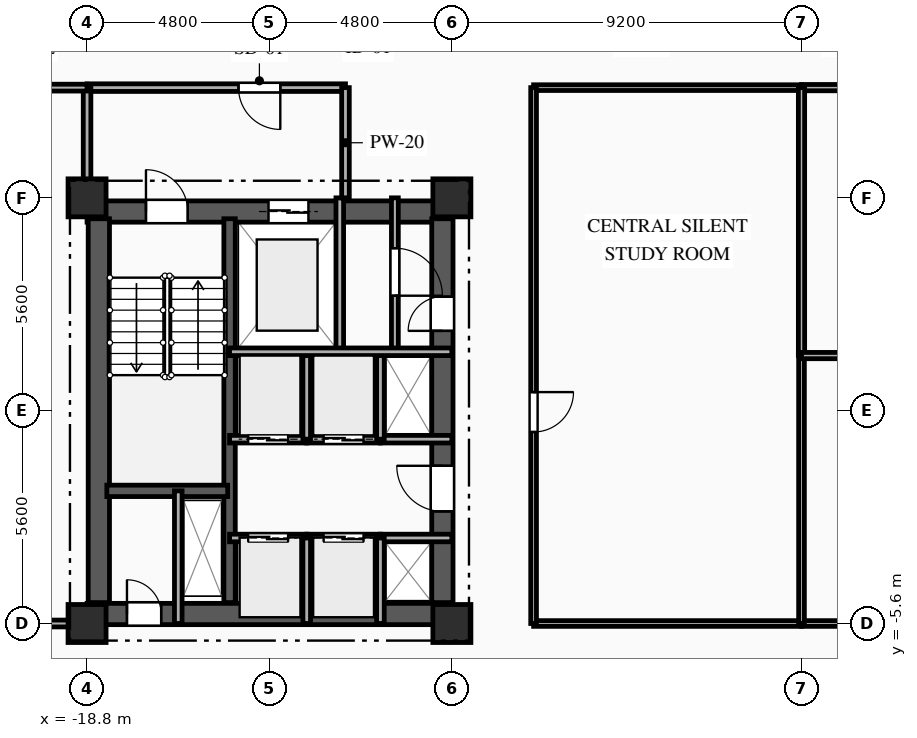
"""IFC4 building model, lengths in metres.
Left out: names, types, materials, properties, quantities, classifications, styles, units other than length and angle.
Written with IfcOpenShell. Run it as: python <this file> out.ifc"""

import sys

from ifc_helpers import new_model, si_unit, direction, frame, frame_2d, origin, origin_2d, place, context, subcontext, project, spatial, rectangle, extrude, element, fill, save


model = new_model("IFC4")
c1 = context("Model", 3, precision=1e-05, world=origin(), true_north=direction((0.0, 1.0)))
c2 = subcontext(c1, "Body", "Model", "MODEL_VIEW")
j1 = project(units=[si_unit("LENGTHUNIT", "METRE"), si_unit("PLANEANGLEUNIT", "RADIAN")], contexts=[c1])
p1 = place(None, origin())
s1 = spatial("IfcSite", under=j1, at=p1, CompositionType="ELEMENT")
p2 = place(p1, origin())
s2 = spatial("IfcBuilding", under=s1, at=p2, CompositionType="ELEMENT")
p3 = place(p2, frame((0.0, 0.0, 89.05)))
s3 = spatial("IfcBuildingStorey", under=s2, at=p3, CompositionType="ELEMENT", Elevation=89.05)
for number, where, z_axis, x_axis in (
    (1, (-18.8, -5.6, 0.0), (0.0, 0.0, 1.0), (1.0, 0.0, 0.0)),
    (2, (-18.8, 5.6, 0.0), (0.0, 0.0, 1.0), (1.0, 0.0, 0.0)),
    (3, (-9.2, -5.6, 0.0), (0.0, 0.0, 1.0), (1.0, 0.0, 0.0)),
    (4, (-9.2, 5.6, 0.0), (0.0, 0.0, 1.0), (1.0, 0.0, 0.0)),
):
    element("IfcColumn", number, at=place(p3, frame(where, z_axis=z_axis, x_axis=x_axis)), inside=s3, PredefinedType="COLUMN", context=c2, shape_type="SweptSolid", body=[
        extrude(rectangle(XDim=1.0, YDim=1.0, at=origin_2d()), origin(), (0.0, 0.0, 1.0), 3.35),
    ])
p4 = place(p3, frame((-18.8, 5.24, 0.0), z_axis=(0.0, 0.0, 1.0), x_axis=(1.0, 0.0, 0.0)))
e5 = element("IfcWall", 5, at=p4, inside=s3, PredefinedType="SHEAR", context=c2, shape_type="SweptSolid", body=[
    extrude(rectangle(XDim=9.6, YDim=0.56, at=frame_2d((4.8, 0.0))), origin(), (0.0, 0.0, 1.0), 3.045),
])
p5 = place(p4, frame((1.55, 0.0, 0.0)))
e6 = element("IfcOpeningElement", 6, at=p5, cuts=e5, PredefinedType="OPENING", context=c2, shape_type="SweptSolid", body=[
    extrude(rectangle(XDim=1.1, YDim=2.15, at=frame_2d((0.55, 1.075))), frame((0.0, 0.29, 0.0), z_axis=(0.0, -1.0, 0.0), x_axis=(1.0, 0.0, 0.0)), (0.0, 0.0, 1.0), 0.58),
])
p6 = place(p4, frame((4.775, 0.0, 0.0)))
e7 = element("IfcOpeningElement", 7, at=p6, cuts=e5, PredefinedType="OPENING", context=c2, shape_type="SweptSolid", body=[
    extrude(rectangle(XDim=1.05, YDim=2.1, at=frame_2d((0.525, 1.05))), frame((0.0, 0.29, 0.0), z_axis=(0.0, -1.0, 0.0), x_axis=(1.0, 0.0, 0.0)), (0.0, 0.0, 1.0), 0.58),
])
p7 = place(p3, frame((-18.8, -5.35, 0.0), z_axis=(0.0, 0.0, 1.0), x_axis=(1.0, 0.0, 0.0)))
e8 = element("IfcWall", 8, at=p7, inside=s3, PredefinedType="SHEAR", context=c2, shape_type="SweptSolid", body=[
    extrude(rectangle(XDim=9.6, YDim=0.56, at=frame_2d((4.8, 0.0))), origin(), (0.0, 0.0, 1.0), 3.045),
])
p8 = place(p7, frame((1.05, 0.0, 0.0)))
e9 = element("IfcOpeningElement", 9, at=p8, cuts=e8, PredefinedType="OPENING", context=c2, shape_type="SweptSolid", body=[
    extrude(rectangle(XDim=0.9, YDim=2.1, at=frame_2d((0.45, 1.05))), frame((0.0, 0.29, 0.0), z_axis=(0.0, -1.0, 0.0), x_axis=(1.0, 0.0, 0.0)), (0.0, 0.0, 1.0), 0.58),
])
p9 = place(p3, frame((-18.49, -5.05, 0.0), z_axis=(0.0, 0.0, 1.0), x_axis=(0.0, 1.0, 0.0)))
e10 = element("IfcWall", 10, at=p9, inside=s3, PredefinedType="SHEAR", context=c2, shape_type="SweptSolid", body=[
    extrude(rectangle(XDim=10.1, YDim=0.56, at=frame_2d((5.05, 0.0))), origin(), (0.0, 0.0, 1.0), 3.045),
])
p10 = place(p3, frame((-9.45, -5.05, 0.0), z_axis=(0.0, 0.0, 1.0), x_axis=(0.0, 1.0, 0.0)))
e11 = element("IfcWall", 11, at=p10, inside=s3, PredefinedType="SHEAR", context=c2, shape_type="SweptSolid", body=[
    extrude(rectangle(XDim=10.1, YDim=0.56, at=frame_2d((5.05, 0.0))), origin(), (0.0, 0.0, 1.0), 3.045),
])
p11 = place(p10, frame((7.15, 0.0, 0.0)))
e12 = element("IfcOpeningElement", 12, at=p11, cuts=e11, PredefinedType="OPENING", context=c2, shape_type="SweptSolid", body=[
    extrude(rectangle(XDim=0.9, YDim=2.1, at=frame_2d((0.45, 1.05))), frame((0.0, 0.29, 0.0), z_axis=(0.0, -1.0, 0.0), x_axis=(1.0, 0.0, 0.0)), (0.0, 0.0, 1.0), 0.58),
])
p12 = place(p10, frame((2.4, 0.0, 0.0)))
e13 = element("IfcOpeningElement", 13, at=p12, cuts=e11, PredefinedType="OPENING", context=c2, shape_type="SweptSolid", body=[
    extrude(rectangle(XDim=1.2, YDim=2.15, at=frame_2d((0.6, 1.075))), frame((0.0, 0.29, 0.0), z_axis=(0.0, -1.0, 0.0), x_axis=(1.0, 0.0, 0.0)), (0.0, 0.0, 1.0), 0.58),
])
p13 = place(p3, frame((-15.05, -5.05, 0.0), z_axis=(0.0, 0.0, 1.0), x_axis=(0.0, 1.0, 0.0)))
e14 = element("IfcWall", 14, at=p13, inside=s3, PredefinedType="SHEAR", context=c2, shape_type="SweptSolid", body=[
    extrude(rectangle(XDim=10.1, YDim=0.3, at=frame_2d((5.05, 0.0))), origin(), (0.0, 0.0, 1.0), 3.045),
])
p14 = place(p3, frame((-18.28, -2.11, 0.0), z_axis=(0.0, 0.0, 1.0), x_axis=(1.0, 0.0, 0.0)))
e15 = element("IfcWall", 15, at=p14, inside=s3, PredefinedType="SHEAR", context=c2, shape_type="SweptSolid", body=[
    extrude(rectangle(XDim=3.18, YDim=0.3, at=frame_2d((1.59, 0.0))), origin(), (0.0, 0.0, 1.0), 3.045),
])
p15 = place(p3, frame((-16.4, -5.6, 0.0), z_axis=(0.0, 0.0, 1.0), x_axis=(0.0, 1.0, 0.0)))
e16 = element("IfcWall", 16, at=p15, inside=s3, PredefinedType="PARTITIONING", context=c2, shape_type="SweptSolid", body=[
    extrude(rectangle(XDim=3.49, YDim=0.2, at=frame_2d((1.745, 0.0))), origin(), (0.0, 0.0, 1.0), 3.045),
])
p16 = place(p3, frame((-12.15, 1.55, 0.0), z_axis=(0.0, 0.0, 1.0), x_axis=(0.0, 1.0, 0.0)))
e17 = element("IfcWall", 17, at=p16, inside=s3, PredefinedType="PARTITIONING", context=c2, shape_type="SweptSolid", body=[
    extrude(rectangle(XDim=4.05, YDim=0.2, at=frame_2d((2.025, 0.0))), origin(), (0.0, 0.0, 1.0), 3.045),
])
p17 = place(p3, frame((-12.0, 8.5, 0.0), z_axis=(0.0, 0.0, 1.0), x_axis=(-1.0, 0.0, 0.0)))
e18 = element("IfcWall", 18, at=p17, inside=s3, PredefinedType="PARTITIONING", context=c2, shape_type="SweptSolid", body=[
    extrude(rectangle(XDim=6.8, YDim=0.2, at=frame_2d((3.4, 0.0))), origin(), (0.0, 0.0, 1.0), 3.045),
])
p18 = place(p17, frame((1.715, 0.0, 0.0)))
e19 = element("IfcOpeningElement", 19, at=p18, cuts=e18, PredefinedType="OPENING", context=c2, shape_type="SweptSolid", body=[
    extrude(rectangle(XDim=1.1, YDim=2.15, at=frame_2d((0.55, 1.075))), frame((0.0, 0.11, 0.0), z_axis=(0.0, -1.0, 0.0), x_axis=(1.0, 0.0, 0.0)), (0.0, 0.0, 1.0), 0.22),
])
p19 = place(p3, frame((-12.0, 5.6, 0.0), z_axis=(0.0, 0.0, 1.0), x_axis=(0.0, 1.0, 0.0)))
e20 = element("IfcWall", 20, at=p19, inside=s3, PredefinedType="PARTITIONING", context=c2, shape_type="SweptSolid", body=[
    extrude(rectangle(XDim=2.9, YDim=0.2, at=frame_2d((1.45, 0.0))), origin(), (0.0, 0.0, 1.0), 3.045),
])
p20 = place(p3, frame((-18.8, 8.5, 0.0), z_axis=(0.0, 0.0, 1.0), x_axis=(0.0, -1.0, 0.0)))
e21 = element("IfcWall", 21, at=p20, inside=s3, PredefinedType="PARTITIONING", context=c2, shape_type="SweptSolid", body=[
    extrude(rectangle(XDim=2.9, YDim=0.2, at=frame_2d((1.45, 0.0))), origin(), (0.0, 0.0, 1.0), 2.53),
])
p21 = place(p3, frame((-10.7, 5.6, 0.0), z_axis=(0.0, 0.0, 1.0), x_axis=(0.0, -1.0, 0.0)))
e22 = element("IfcWall", 22, at=p21, inside=s3, PredefinedType="PARTITIONING", context=c2, shape_type="SweptSolid", body=[
    extrude(rectangle(XDim=4.05, YDim=0.18, at=frame_2d((2.025, 0.0))), origin(), (0.0, 0.0, 1.0), 3.045),
])
p22 = place(p21, frame((1.325, 0.0, 0.0)))
e23 = element("IfcOpeningElement", 23, at=p22, cuts=e22, PredefinedType="OPENING", context=c2, shape_type="SweptSolid", body=[
    extrude(rectangle(XDim=1.25, YDim=2.2, at=frame_2d((0.625, 1.1))), frame((0.0, 0.1, 0.0), z_axis=(0.0, -1.0, 0.0), x_axis=(1.0, 0.0, 0.0)), (0.0, 0.0, 1.0), 0.2),
])
p23 = place(p3, frame((-15.05, -3.35, 0.0), z_axis=(0.0, 0.0, 1.0), x_axis=(1.0, 0.0, 0.0)))
e24 = element("IfcWall", 24, at=p23, inside=s3, PredefinedType="PARTITIONING", context=c2, shape_type="SweptSolid", body=[
    extrude(rectangle(XDim=2.03, YDim=0.2, at=frame_2d((1.015, 0.0))), origin(), (0.0, 0.0, 1.0), 3.045),
])
p24 = place(p23, frame((0.49, 0.0, 0.0)))
e25 = element("IfcOpeningElement", 25, at=p24, cuts=e24, PredefinedType="OPENING", context=c2, shape_type="SweptSolid", body=[
    extrude(rectangle(XDim=1.05, YDim=2.1, at=frame_2d((0.525, 1.05))), frame((0.0, 0.11, 0.0), z_axis=(0.0, -1.0, 0.0), x_axis=(1.0, 0.0, 0.0)), (0.0, 0.0, 1.0), 0.22),
])
p25 = place(p3, frame((-13.02, -3.35, 0.0), z_axis=(0.0, 0.0, 1.0), x_axis=(1.0, 0.0, 0.0)))
e26 = element("IfcWall", 26, at=p25, inside=s3, PredefinedType="PARTITIONING", context=c2, shape_type="SweptSolid", body=[
    extrude(rectangle(XDim=1.94, YDim=0.2, at=frame_2d((0.97, 0.0))), origin(), (0.0, 0.0, 1.0), 3.045),
])
p26 = place(p25, frame((0.445, 0.0, 0.0)))
e27 = element("IfcOpeningElement", 27, at=p26, cuts=e26, PredefinedType="OPENING", context=c2, shape_type="SweptSolid", body=[
    extrude(rectangle(XDim=1.05, YDim=2.1, at=frame_2d((0.525, 1.05))), frame((0.0, 0.11, 0.0), z_axis=(0.0, -1.0, 0.0), x_axis=(1.0, 0.0, 0.0)), (0.0, 0.0, 1.0), 0.22),
])
p27 = place(p3, frame((-11.08, -3.35, 0.0), z_axis=(0.0, 0.0, 1.0), x_axis=(1.0, 0.0, 0.0)))
e28 = element("IfcWall", 28, at=p27, inside=s3, PredefinedType="PARTITIONING", context=c2, shape_type="SweptSolid", body=[
    extrude(rectangle(XDim=1.88, YDim=0.2, at=frame_2d((0.94, 0.0))), origin(), (0.0, 0.0, 1.0), 2.76),
])
p28 = place(p3, frame((-13.02, -0.75, 0.0), z_axis=(0.0, 0.0, 1.0), x_axis=(-1.0, 0.0, 0.0)))
e29 = element("IfcWall", 29, at=p28, inside=s3, PredefinedType="PARTITIONING", context=c2, shape_type="SweptSolid", body=[
    extrude(rectangle(XDim=2.03, YDim=0.2, at=frame_2d((1.015, 0.0))), origin(), (0.0, 0.0, 1.0), 3.045),
])
p29 = place(p28, frame((0.49, 0.0, 0.0)))
e30 = element("IfcOpeningElement", 30, at=p29, cuts=e29, PredefinedType="OPENING", context=c2, shape_type="SweptSolid", body=[
    extrude(rectangle(XDim=1.05, YDim=2.1, at=frame_2d((0.525, 1.05))), frame((0.0, 0.11, 0.0), z_axis=(0.0, -1.0, 0.0), x_axis=(1.0, 0.0, 0.0)), (0.0, 0.0, 1.0), 0.22),
])
p30 = place(p3, frame((-11.08, -0.75, 0.0), z_axis=(0.0, 0.0, 1.0), x_axis=(-1.0, 0.0, 0.0)))
e31 = element("IfcWall", 31, at=p30, inside=s3, PredefinedType="PARTITIONING", context=c2, shape_type="SweptSolid", body=[
    extrude(rectangle(XDim=1.94, YDim=0.2, at=frame_2d((0.97, 0.0))), origin(), (0.0, 0.0, 1.0), 3.045),
])
p31 = place(p30, frame((0.445, 0.0, 0.0)))
e32 = element("IfcOpeningElement", 32, at=p31, cuts=e31, PredefinedType="OPENING", context=c2, shape_type="SweptSolid", body=[
    extrude(rectangle(XDim=1.05, YDim=2.1, at=frame_2d((0.525, 1.05))), frame((0.0, 0.11, 0.0), z_axis=(0.0, -1.0, 0.0), x_axis=(1.0, 0.0, 0.0)), (0.0, 0.0, 1.0), 0.22),
])
p32 = place(p3, frame((-9.2, -0.75, 0.0), z_axis=(0.0, 0.0, 1.0), x_axis=(-1.0, 0.0, 0.0)))
e33 = element("IfcWall", 33, at=p32, inside=s3, PredefinedType="PARTITIONING", context=c2, shape_type="SweptSolid", body=[
    extrude(rectangle(XDim=1.88, YDim=0.2, at=frame_2d((0.94, 0.0))), origin(), (0.0, 0.0, 1.0), 3.045),
])
for number, where, z_axis, x_axis in (
    (34, (-13.02, -5.6, 0.0), (0.0, 0.0, 1.0), (0.0, 1.0, 0.0)),
    (35, (-11.08, -5.6, 0.0), (0.0, 0.0, 1.0), (0.0, 1.0, 0.0)),
):
    element("IfcWall", number, at=place(p3, frame(where, z_axis=z_axis, x_axis=x_axis)), inside=s3, PredefinedType="PARTITIONING", context=c2, shape_type="SweptSolid", body=[
        extrude(rectangle(XDim=2.25, YDim=0.2, at=frame_2d((1.125, 0.0))), origin(), (0.0, 0.0, 1.0), 3.045),
    ])
for number, where, z_axis, x_axis in (
    (36, (-13.02, -0.75, 0.0), (0.0, 0.0, 1.0), (0.0, 1.0, 0.0)),
    (37, (-11.08, -0.75, 0.0), (0.0, 0.0, 1.0), (0.0, 1.0, 0.0)),
):
    element("IfcWall", number, at=place(p3, frame(where, z_axis=z_axis, x_axis=x_axis)), inside=s3, PredefinedType="PARTITIONING", context=c2, shape_type="SweptSolid", body=[
        extrude(rectangle(XDim=2.3, YDim=0.2, at=frame_2d((1.15, 0.0))), origin(), (0.0, 0.0, 1.0), 3.045),
    ])
p33 = place(p3, frame((-18.8, 8.5, 0.0), z_axis=(0.0, 0.0, 1.0), x_axis=(-1.0, 0.0, 0.0)))
e38 = element("IfcWall", 38, at=p33, inside=s3, PredefinedType="PARTITIONING", context=c2, shape_type="SweptSolid", body=[
    extrude(rectangle(XDim=2.65, YDim=0.18, at=frame_2d((1.325, 0.0))), origin(), (0.0, 0.0, 1.0), 3.045),
])
p34 = place(p33, frame((1.009, 0.0, 0.0)))
e39 = element("IfcOpeningElement", 39, at=p34, cuts=e38, PredefinedType="OPENING", context=c2, shape_type="SweptSolid", body=[
    extrude(rectangle(XDim=1.0, YDim=2.15, at=frame_2d((0.5, 1.075))), frame((0.0, 0.1, 0.0), z_axis=(0.0, -1.0, 0.0), x_axis=(1.0, 0.0, 0.0)), (0.0, 0.0, 1.0), 0.2),
])
p35 = place(p3, frame((0.0, 8.5, 0.0), z_axis=(0.0, 0.0, 1.0), x_axis=(-1.0, 0.0, 0.0)))
e40 = element("IfcWall", 40, at=p35, inside=s3, PredefinedType="PARTITIONING", context=c2, shape_type="SweptSolid", body=[
    extrude(rectangle(XDim=7.05, YDim=0.15, at=frame_2d((3.525, 0.0))), origin(), (0.0, 0.0, 1.0), 3.045),
])
p36 = place(p3, frame((7.05, 8.5, 0.0), z_axis=(0.0, 0.0, 1.0), x_axis=(-1.0, 0.0, 0.0)))
e41 = element("IfcWall", 41, at=p36, inside=s3, PredefinedType="PARTITIONING", context=c2, shape_type="SweptSolid", body=[
    extrude(rectangle(XDim=7.05, YDim=0.165, at=frame_2d((3.525, 0.0))), origin(), (0.0, 0.0, 1.0), 3.045),
])
p37 = place(p36, frame((4.728, 0.0, 0.0)))
e42 = element("IfcOpeningElement", 42, at=p37, cuts=e41, PredefinedType="OPENING", context=c2, shape_type="SweptSolid", body=[
    extrude(rectangle(XDim=1.15, YDim=2.15, at=frame_2d((0.575, 1.075))), frame((0.0, 0.093, 0.0), z_axis=(0.0, -1.0, 0.0), x_axis=(1.0, 0.0, 0.0)), (0.0, 0.0, 1.0), 0.185),
])
p38 = place(p3, frame((-21.45, -5.6, 0.0), z_axis=(0.0, 0.0, 1.0), x_axis=(1.0, 0.0, 0.0)))
e43 = element("IfcWall", 43, at=p38, inside=s3, PredefinedType="PARTITIONING", context=c2, shape_type="SweptSolid", body=[
    extrude(rectangle(XDim=2.65, YDim=0.18, at=frame_2d((1.325, 0.0))), origin(), (0.0, 0.0, 1.0), 3.045),
])
p39 = place(p3, frame((-7.05, -5.6, 0.0), z_axis=(0.0, 0.0, 1.0), x_axis=(1.0, 0.0, 0.0)))
e44 = element("IfcWall", 44, at=p39, inside=s3, PredefinedType="PARTITIONING", context=c2, shape_type="SweptSolid", body=[
    extrude(rectangle(XDim=7.05, YDim=0.15, at=frame_2d((3.525, 0.0))), origin(), (0.0, 0.0, 1.0), 2.53),
])
p40 = place(p3, frame((0.0, -5.6, 0.0), z_axis=(0.0, 0.0, 1.0), x_axis=(1.0, 0.0, 0.0)))
e45 = element("IfcWall", 45, at=p40, inside=s3, PredefinedType="PARTITIONING", context=c2, shape_type="SweptSolid", body=[
    extrude(rectangle(XDim=7.05, YDim=0.15, at=frame_2d((3.525, 0.0))), origin(), (0.0, 0.0, 1.0), 2.53),
])
p41 = place(p40, frame((1.185, 0.0, 0.0)))
e46 = element("IfcOpeningElement", 46, at=p41, cuts=e45, PredefinedType="OPENING", context=c2, shape_type="SweptSolid", body=[
    extrude(rectangle(XDim=1.05, YDim=2.15, at=frame_2d((0.525, 1.075))), frame((0.0, 0.085, 0.0), z_axis=(0.0, -1.0, 0.0), x_axis=(1.0, 0.0, 0.0)), (0.0, 0.0, 1.0), 0.17),
])
p42 = place(p3, frame((-7.05, 8.5, 0.0), z_axis=(0.0, 0.0, 1.0), x_axis=(0.0, -1.0, 0.0)))
e47 = element("IfcWall", 47, at=p42, inside=s3, PredefinedType="PARTITIONING", context=c2, shape_type="SweptSolid", body=[
    extrude(rectangle(XDim=14.1, YDim=0.15, at=frame_2d((7.05, 0.0))), origin(), (0.0, 0.0, 1.0), 3.045),
])
p43 = place(p42, frame((8.011, 0.0, 0.0)))
e48 = element("IfcOpeningElement", 48, at=p43, cuts=e47, PredefinedType="OPENING", context=c2, shape_type="SweptSolid", body=[
    extrude(rectangle(XDim=1.05, YDim=2.15, at=frame_2d((0.525, 1.075))), frame((0.0, 0.085, 0.0), z_axis=(0.0, -1.0, 0.0), x_axis=(1.0, 0.0, 0.0)), (0.0, 0.0, 1.0), 0.17),
])
p44 = place(p3, frame((0.0, 1.45, 0.0), z_axis=(0.0, 0.0, 1.0), x_axis=(0.0, -1.0, 0.0)))
e49 = element("IfcWall", 49, at=p44, inside=s3, PredefinedType="PARTITIONING", context=c2, shape_type="SweptSolid", body=[
    extrude(rectangle(XDim=7.05, YDim=0.15, at=frame_2d((3.525, 0.0))), origin(), (0.0, 0.0, 1.0), 3.045),
])
for number, where, z_axis, x_axis in (
    (50, (0.0, 8.5, 0.0), (0.0, 0.0, 1.0), (0.0, -1.0, 0.0)),
    (51, (0.0, 1.45, 0.0), (0.0, 0.0, 1.0), (1.0, 0.0, 0.0)),
):
    element("IfcWall", number, at=place(p3, frame(where, z_axis=z_axis, x_axis=x_axis)), inside=s3, PredefinedType="PARTITIONING", context=c2, shape_type="SweptSolid", body=[
        extrude(rectangle(XDim=7.05, YDim=0.165, at=frame_2d((3.525, 0.0))), origin(), (0.0, 0.0, 1.0), 3.045),
    ])
p45 = place(p3, frame((-15.05, 1.55, 0.0), z_axis=(0.0, 0.0, 1.0), x_axis=(1.0, 0.0, 0.0)))
e52 = element("IfcWall", 52, at=p45, inside=s3, PredefinedType="PARTITIONING", context=c2, shape_type="SweptSolid", body=[
    extrude(rectangle(XDim=5.85, YDim=0.2, at=frame_2d((2.925, 0.0))), origin(), (0.0, 0.0, 1.0), 3.045),
])
p46 = place(p5, origin())
e53 = element("IfcDoor", 53, at=p46, inside=s3, OperationType="SINGLE_SWING_LEFT", PredefinedType="DOOR", context=c2, shape_type="SweptSolid", body=[
    extrude(rectangle(XDim=1.1, YDim=2.15, at=frame_2d((0.55, 1.075))), frame((0.0, 0.025, 0.0), z_axis=(0.0, -1.0, 0.0), x_axis=(1.0, 0.0, 0.0)), (0.0, 0.0, 1.0), 0.05),
])
fill(e6, e53)
p47 = place(p6, origin())
e54 = element("IfcDoor", 54, at=p47, inside=s3, OperationType="DOUBLE_DOOR_SLIDING", PredefinedType="DOOR", context=c2, shape_type="SweptSolid", body=[
    extrude(rectangle(XDim=1.05, YDim=2.1, at=frame_2d((0.525, 1.05))), frame((0.0, 0.025, 0.0), z_axis=(0.0, -1.0, 0.0), x_axis=(1.0, 0.0, 0.0)), (0.0, 0.0, 1.0), 0.05),
])
fill(e7, e54)
p48 = place(p8, origin())
e55 = element("IfcDoor", 55, at=p48, inside=s3, OperationType="SINGLE_SWING_LEFT", PredefinedType="DOOR", context=c2, shape_type="SweptSolid", body=[
    extrude(rectangle(XDim=0.9, YDim=2.1, at=frame_2d((0.45, 1.05))), frame((0.0, 0.025, 0.0), z_axis=(0.0, -1.0, 0.0), x_axis=(1.0, 0.0, 0.0)), (0.0, 0.0, 1.0), 0.05),
])
fill(e9, e55)
p49 = place(p18, origin())
e56 = element("IfcDoor", 56, at=p49, inside=s3, OperationType="SINGLE_SWING_LEFT", PredefinedType="DOOR", context=c2, shape_type="SweptSolid", body=[
    extrude(rectangle(XDim=1.1, YDim=2.15, at=frame_2d((0.55, 1.075))), frame((0.0, 0.025, 0.0), z_axis=(0.0, -1.0, 0.0), x_axis=(1.0, 0.0, 0.0)), (0.0, 0.0, 1.0), 0.05),
])
fill(e19, e56)
p50 = place(p22, origin())
e57 = element("IfcDoor", 57, at=p50, inside=s3, OperationType="SINGLE_SWING_RIGHT", PredefinedType="DOOR", context=c2, shape_type="SweptSolid", body=[
    extrude(rectangle(XDim=1.25, YDim=2.2, at=frame_2d((0.625, 1.1))), frame((0.0, 0.025, 0.0), z_axis=(0.0, -1.0, 0.0), x_axis=(1.0, 0.0, 0.0)), (0.0, 0.0, 1.0), 0.05),
])
fill(e23, e57)
p51 = place(p11, origin())
e58 = element("IfcDoor", 58, at=p51, inside=s3, OperationType="SINGLE_SWING_LEFT", PredefinedType="DOOR", context=c2, shape_type="SweptSolid", body=[
    extrude(rectangle(XDim=0.9, YDim=2.1, at=frame_2d((0.45, 1.05))), frame((0.0, 0.025, 0.0), z_axis=(0.0, -1.0, 0.0), x_axis=(1.0, 0.0, 0.0)), (0.0, 0.0, 1.0), 0.05),
])
fill(e12, e58)
p52 = place(p24, origin())
e59 = element("IfcDoor", 59, at=p52, inside=s3, OperationType="DOUBLE_DOOR_SLIDING", PredefinedType="DOOR", context=c2, shape_type="SweptSolid", body=[
    extrude(rectangle(XDim=1.05, YDim=2.1, at=frame_2d((0.525, 1.05))), frame((0.0, 0.025, 0.0), z_axis=(0.0, -1.0, 0.0), x_axis=(1.0, 0.0, 0.0)), (0.0, 0.0, 1.0), 0.05),
])
fill(e25, e59)
p53 = place(p26, origin())
e60 = element("IfcDoor", 60, at=p53, inside=s3, OperationType="DOUBLE_DOOR_SLIDING", PredefinedType="DOOR", context=c2, shape_type="SweptSolid", body=[
    extrude(rectangle(XDim=1.05, YDim=2.1, at=frame_2d((0.525, 1.05))), frame((0.0, 0.025, 0.0), z_axis=(0.0, -1.0, 0.0), x_axis=(1.0, 0.0, 0.0)), (0.0, 0.0, 1.0), 0.05),
])
fill(e27, e60)
p54 = place(p29, origin())
e61 = element("IfcDoor", 61, at=p54, inside=s3, OperationType="DOUBLE_DOOR_SLIDING", PredefinedType="DOOR", context=c2, shape_type="SweptSolid", body=[
    extrude(rectangle(XDim=1.05, YDim=2.1, at=frame_2d((0.525, 1.05))), frame((0.0, 0.025, 0.0), z_axis=(0.0, -1.0, 0.0), x_axis=(1.0, 0.0, 0.0)), (0.0, 0.0, 1.0), 0.05),
])
fill(e30, e61)
p55 = place(p31, origin())
e62 = element("IfcDoor", 62, at=p55, inside=s3, OperationType="DOUBLE_DOOR_SLIDING", PredefinedType="DOOR", context=c2, shape_type="SweptSolid", body=[
    extrude(rectangle(XDim=1.05, YDim=2.1, at=frame_2d((0.525, 1.05))), frame((0.0, 0.025, 0.0), z_axis=(0.0, -1.0, 0.0), x_axis=(1.0, 0.0, 0.0)), (0.0, 0.0, 1.0), 0.05),
])
fill(e32, e62)
p56 = place(p12, origin())
e63 = element("IfcDoor", 63, at=p56, inside=s3, OperationType="SINGLE_SWING_RIGHT", PredefinedType="DOOR", context=c2, shape_type="SweptSolid", body=[
    extrude(rectangle(XDim=1.2, YDim=2.15, at=frame_2d((0.6, 1.075))), frame((0.0, 0.025, 0.0), z_axis=(0.0, -1.0, 0.0), x_axis=(1.0, 0.0, 0.0)), (0.0, 0.0, 1.0), 0.05),
])
fill(e13, e63)
p57 = place(p43, origin())
e64 = element("IfcDoor", 64, at=p57, inside=s3, OperationType="SINGLE_SWING_LEFT", PredefinedType="DOOR", context=c2, shape_type="SweptSolid", body=[
    extrude(rectangle(XDim=1.05, YDim=2.15, at=frame_2d((0.525, 1.075))), frame((0.0, 0.025, 0.0), z_axis=(0.0, -1.0, 0.0), x_axis=(1.0, 0.0, 0.0)), (0.0, 0.0, 1.0), 0.05),
])
fill(e48, e64)
save(model, sys.argv[1])
